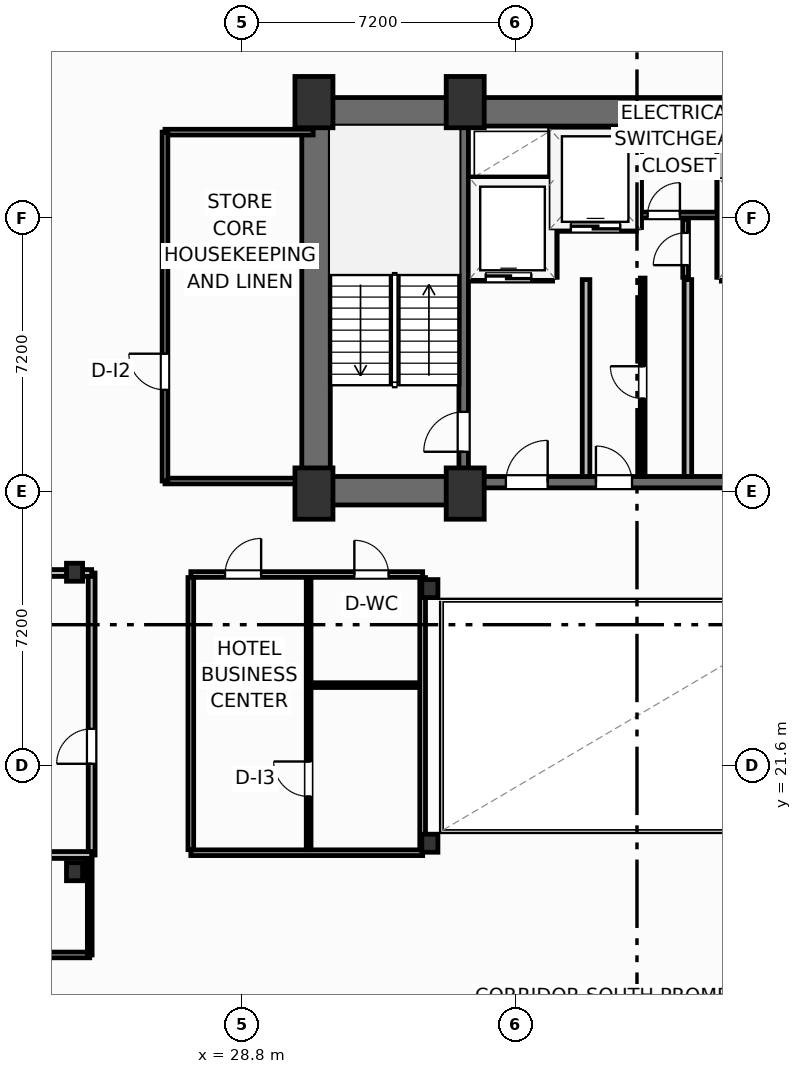
"""IFC4 building model, lengths in metres.
Left out: names, types, materials, properties, quantities, classifications, styles, units other than length and angle.
Written with IfcOpenShell. Run it as: python <this file> out.ifc"""

import sys

from ifc_helpers import new_model, si_unit, direction, frame, frame_2d, origin, origin_2d, place, context, subcontext, project, spatial, rectangle, i_section, extrude, element, fill, save


model = new_model("IFC4")
c1 = context("Model", 3, precision=1e-05, world=origin(), true_north=direction((0.0, 1.0)))
c2 = subcontext(c1, "Body", "Model", "MODEL_VIEW")
j1 = project(units=[si_unit("LENGTHUNIT", "METRE"), si_unit("PLANEANGLEUNIT", "RADIAN")], contexts=[c1])
p1 = place(None, origin())
s1 = spatial("IfcSite", under=j1, at=p1, CompositionType="ELEMENT")
p2 = place(p1, origin())
s2 = spatial("IfcBuilding", under=s1, at=p2, CompositionType="ELEMENT")
p3 = place(p2, frame((0.0, 0.0, 132.8)))
s3 = spatial("IfcBuildingStorey", under=s2, at=p3, CompositionType="ELEMENT", Elevation=132.8)
for number, where, z_axis, x_axis in (
    (1, (30.7, 28.75, 0.0), (0.0, 0.0, 1.0), (1.0, 0.0, 0.0)),
    (2, (34.68, 28.75, 0.0), (0.0, 0.0, 1.0), (1.0, 0.0, 0.0)),
    (3, (30.7, 39.05, 0.0), (0.0, 0.0, 1.0), (1.0, 0.0, 0.0)),
    (4, (34.68, 39.05, 0.0), (0.0, 0.0, 1.0), (1.0, 0.0, 0.0)),
):
    element("IfcColumn", number, at=place(p3, frame(where, z_axis=z_axis, x_axis=x_axis)), inside=s3, PredefinedType="COLUMN", context=c2, shape_type="SweptSolid", body=[
        extrude(rectangle(XDim=1.0, YDim=1.35, at=origin_2d()), origin(), (0.0, 0.0, 1.0), 3.7),
    ])
for number, where, z_axis, x_axis in (
    (5, (33.75, 19.55, 0.0), (0.0, 0.0, 1.0), (1.0, 0.0, 0.0)),
    (6, (33.75, 26.25, 0.0), (0.0, 0.0, 1.0), (1.0, 0.0, 0.0)),
    (7, (24.4, 18.8, 0.0), (0.0, 0.0, 1.0), (1.0, 0.0, 0.0)),
    (8, (24.4, 26.68, 0.0), (0.0, 0.0, 1.0), (1.0, 0.0, 0.0)),
):
    element("IfcColumn", number, at=place(p3, frame(where, z_axis=z_axis, x_axis=x_axis)), inside=s3, PredefinedType="COLUMN", context=c2, shape_type="SweptSolid", body=[
        extrude(i_section(OverallWidth=0.424, OverallDepth=0.474, WebThickness=0.048, FlangeThickness=0.077, FilletRadius=0.025, at=origin_2d()), origin(), (0.0, 0.0, 1.0), 3.7),
    ])
p4 = place(p3, frame((30.38, 38.795, 0.0), z_axis=(0.0, 0.0, 1.0), x_axis=(1.0, 0.0, 0.0)))
e9 = element("IfcWall", 9, at=p4, inside=s3, PredefinedType="SHEAR", context=c2, shape_type="SweptSolid", body=[
    extrude(rectangle(XDim=17.64, YDim=0.75, at=frame_2d((8.82, 0.0))), origin(), (0.0, 0.0, 1.0), 3.45),
])
p5 = place(p3, frame((30.755, 29.2, 0.0), z_axis=(0.0, 0.0, 1.0), x_axis=(0.0, 1.0, 0.0)))
e10 = element("IfcWall", 10, at=p5, inside=s3, PredefinedType="SHEAR", context=c2, shape_type="SweptSolid", body=[
    extrude(rectangle(XDim=9.22, YDim=0.75, at=frame_2d((4.61, 0.0))), origin(), (0.0, 0.0, 1.0), 3.45),
])
p6 = place(p3, frame((30.38, 28.825, 0.0), z_axis=(0.0, 0.0, 1.0), x_axis=(1.0, 0.0, 0.0)))
e11 = element("IfcWall", 11, at=p6, inside=s3, PredefinedType="SHEAR", context=c2, shape_type="SweptSolid", body=[
    extrude(rectangle(XDim=4.42, YDim=0.75, at=frame_2d((2.21, 0.0))), origin(), (0.0, 0.0, 1.0), 3.45),
])
p7 = place(p3, frame((34.8, 29.05, 0.0), z_axis=(0.0, 0.0, 1.0), x_axis=(1.0, 0.0, 0.0)))
e12 = element("IfcWall", 12, at=p7, inside=s3, PredefinedType="SHEAR", context=c2, shape_type="SweptSolid", body=[
    extrude(rectangle(XDim=8.8, YDim=0.3, at=frame_2d((4.4, 0.0))), origin(), (0.0, 0.0, 1.0), 3.45),
])
p8 = place(p7, frame((0.95, 0.0, 0.0)))
e13 = element("IfcOpeningElement", 13, at=p8, cuts=e12, PredefinedType="OPENING", context=c2, shape_type="SweptSolid", body=[
    extrude(rectangle(XDim=1.1, YDim=2.15, at=frame_2d((0.55, 1.075))), frame((0.0, 0.16, 0.0), z_axis=(0.0, -1.0, 0.0), x_axis=(1.0, 0.0, 0.0)), (0.0, 0.0, 1.0), 0.32),
])
p9 = place(p7, frame((6.75, 0.0, 0.0)))
e14 = element("IfcOpeningElement", 14, at=p9, cuts=e12, PredefinedType="OPENING", context=c2, shape_type="SweptSolid", body=[
    extrude(rectangle(XDim=1.1, YDim=2.15, at=frame_2d((0.55, 1.075))), frame((0.0, 0.16, 0.0), z_axis=(0.0, -1.0, 0.0), x_axis=(1.0, 0.0, 0.0)), (0.0, 0.0, 1.0), 0.32),
])
p10 = place(p7, frame((3.32, 0.0, 0.0)))
e15 = element("IfcOpeningElement", 15, at=p10, cuts=e12, PredefinedType="OPENING", context=c2, shape_type="SweptSolid", body=[
    extrude(rectangle(XDim=0.95, YDim=2.15, at=frame_2d((0.475, 1.075))), frame((0.0, 0.16, 0.0), z_axis=(0.0, -1.0, 0.0), x_axis=(1.0, 0.0, 0.0)), (0.0, 0.0, 1.0), 0.32),
])
p11 = place(p3, frame((34.64, 29.2, 0.0), z_axis=(0.0, 0.0, 1.0), x_axis=(0.0, 1.0, 0.0)))
e16 = element("IfcWall", 16, at=p11, inside=s3, PredefinedType="SHEAR", context=c2, shape_type="SweptSolid", body=[
    extrude(rectangle(XDim=9.22, YDim=0.25, at=frame_2d((4.61, 0.0))), origin(), (0.0, 0.0, 1.0), 3.45),
])
p12 = place(p11, frame((0.65, 0.0, 0.0)))
e17 = element("IfcOpeningElement", 17, at=p12, cuts=e16, PredefinedType="OPENING", context=c2, shape_type="SweptSolid", body=[
    extrude(rectangle(XDim=1.05, YDim=2.15, at=frame_2d((0.525, 1.075))), frame((0.0, 0.135, 0.0), z_axis=(0.0, -1.0, 0.0), x_axis=(1.0, 0.0, 0.0)), (0.0, 0.0, 1.0), 0.27),
])
p13 = place(p3, frame((5.0, 16.61, 0.0), z_axis=(0.0, 0.0, 1.0), x_axis=(1.0, 0.0, 0.0)))
e18 = element("IfcWall", 18, at=p13, inside=s3, PredefinedType="PARTITIONING", context=c2, shape_type="SweptSolid", body=[
    extrude(rectangle(XDim=19.8, YDim=0.15, at=frame_2d((9.9, 0.0))), origin(), (0.0, 0.0, 1.0), 3.45),
])
p14 = place(p13, frame((12.485, 0.0, 0.0)))
e19 = element("IfcOpeningElement", 19, at=p14, cuts=e18, PredefinedType="OPENING", context=c2, shape_type="SweptSolid", body=[
    extrude(rectangle(XDim=0.92, YDim=2.05, at=frame_2d((0.46, 1.025))), frame((0.0, 0.085, 0.0), z_axis=(0.0, -1.0, 0.0), x_axis=(1.0, 0.0, 0.0)), (0.0, 0.0, 1.0), 0.17),
])
p15 = place(p3, frame((24.8, 16.61, 0.0), z_axis=(0.0, 0.0, 1.0), x_axis=(0.0, 1.0, 0.0)))
e20 = element("IfcWall", 20, at=p15, inside=s3, PredefinedType="PARTITIONING", context=c2, shape_type="SweptSolid", body=[
    extrude(rectangle(XDim=2.63, YDim=0.125, at=frame_2d((1.315, 0.0))), origin(), (0.0, 0.0, 1.0), 2.662),
])
p16 = place(p3, frame((24.85, 19.24, 0.0), z_axis=(0.0, 0.0, 1.0), x_axis=(0.0, 1.0, 0.0)))
e21 = element("IfcWall", 21, at=p16, inside=s3, PredefinedType="PARTITIONING", context=c2, shape_type="SweptSolid", body=[
    extrude(rectangle(XDim=7.42, YDim=0.18, at=frame_2d((3.71, 0.0))), origin(), (0.0, 0.0, 1.0), 3.45),
])
p17 = place(p16, frame((2.4, 0.0, 0.0)))
e22 = element("IfcOpeningElement", 22, at=p17, cuts=e21, PredefinedType="OPENING", context=c2, shape_type="SweptSolid", body=[
    extrude(rectangle(XDim=0.92, YDim=2.05, at=frame_2d((0.46, 1.025))), frame((0.0, 0.1, 0.0), z_axis=(0.0, -1.0, 0.0), x_axis=(1.0, 0.0, 0.0)), (0.0, 0.0, 1.0), 0.2),
])
p18 = place(p3, frame((19.2, 19.24, 0.0), z_axis=(0.0, 0.0, 1.0), x_axis=(1.0, 0.0, 0.0)))
e23 = element("IfcWall", 23, at=p18, inside=s3, PredefinedType="PARTITIONING", context=c2, shape_type="SweptSolid", body=[
    extrude(rectangle(XDim=5.65, YDim=0.18, at=frame_2d((2.825, 0.0))), origin(), (0.0, 0.0, 1.0), 3.45),
])
p19 = place(p3, frame((2.073, 26.66, 0.0), z_axis=(0.0, 0.0, 1.0), x_axis=(1.0, 0.0, 0.0)))
e24 = element("IfcWall", 24, at=p19, inside=s3, PredefinedType="PARTITIONING", context=c2, shape_type="SweptSolid", body=[
    extrude(rectangle(XDim=22.777, YDim=0.18, at=frame_2d((11.388, 0.0))), origin(), (0.0, 0.0, 1.0), 2.662),
])
for number, where, z_axis, x_axis in (
    (25, (37.86, 29.2, 0.0), (0.0, 0.0, 1.0), (0.0, 1.0, 0.0)),
    (26, (40.54, 29.2, 0.0), (0.0, 0.0, 1.0), (0.0, 1.0, 0.0)),
):
    element("IfcWall", number, at=place(p3, frame(where, z_axis=z_axis, x_axis=x_axis)), inside=s3, PredefinedType="PARTITIONING", context=c2, shape_type="SweptSolid", body=[
        extrude(rectangle(XDim=5.18, YDim=0.2, at=frame_2d((2.59, 0.0))), origin(), (0.0, 0.0, 1.0), 3.45),
    ])
p20 = place(p3, frame((34.8, 34.44, 0.0), z_axis=(0.0, 0.0, 1.0), x_axis=(1.0, 0.0, 0.0)))
e27 = element("IfcWall", 27, at=p20, inside=s3, PredefinedType="PARTITIONING", context=c2, shape_type="SweptSolid", body=[
    extrude(rectangle(XDim=2.18, YDim=0.2, at=frame_2d((1.09, 0.0))), origin(), (0.0, 0.0, 1.0), 3.45),
])
p21 = place(p20, frame((0.42, 0.0, 0.0)))
e28 = element("IfcOpeningElement", 28, at=p21, cuts=e27, PredefinedType="OPENING", context=c2, shape_type="SweptSolid", body=[
    extrude(rectangle(XDim=1.2, YDim=2.2, at=frame_2d((0.6, 1.1))), frame((0.0, 0.11, 0.0), z_axis=(0.0, -1.0, 0.0), x_axis=(1.0, 0.0, 0.0)), (0.0, 0.0, 1.0), 0.22),
])
p22 = place(p3, frame((34.8, 36.98, 0.0), z_axis=(0.0, 0.0, 1.0), x_axis=(1.0, 0.0, 0.0)))
e29 = element("IfcWall", 29, at=p22, inside=s3, PredefinedType="PARTITIONING", context=c2, shape_type="SweptSolid", body=[
    extrude(rectangle(XDim=2.18, YDim=0.2, at=frame_2d((1.09, 0.0))), origin(), (0.0, 0.0, 1.0), 3.45),
])
for number, where, z_axis, x_axis in (
    (30, (37.0, 34.44, 0.0), (0.0, 0.0, 1.0), (0.0, 1.0, 0.0)),
    (31, (41.4, 34.44, 0.0), (0.0, 0.0, 1.0), (0.0, 1.0, 0.0)),
):
    element("IfcWall", number, at=place(p3, frame(where, z_axis=z_axis, x_axis=x_axis)), inside=s3, PredefinedType="PARTITIONING", context=c2, shape_type="SweptSolid", body=[
        extrude(rectangle(XDim=3.9, YDim=0.2, at=frame_2d((1.95, 0.0))), origin(), (0.0, 0.0, 1.0), 3.45),
    ])
p23 = place(p3, frame((37.06, 35.75, 0.0), z_axis=(0.0, 0.0, 1.0), x_axis=(1.0, 0.0, 0.0)))
e32 = element("IfcWall", 32, at=p23, inside=s3, PredefinedType="PARTITIONING", context=c2, shape_type="SweptSolid", body=[
    extrude(rectangle(XDim=2.12, YDim=0.2, at=frame_2d((1.06, 0.0))), origin(), (0.0, 0.0, 1.0), 3.45),
])
p24 = place(p23, frame((0.4, 0.0, 0.0)))
e33 = element("IfcOpeningElement", 33, at=p24, cuts=e32, PredefinedType="OPENING", context=c2, shape_type="SweptSolid", body=[
    extrude(rectangle(XDim=1.3, YDim=2.2, at=frame_2d((0.65, 1.1))), frame((0.0, 0.11, 0.0), z_axis=(0.0, -1.0, 0.0), x_axis=(1.0, 0.0, 0.0)), (0.0, 0.0, 1.0), 0.22),
])
p25 = place(p3, frame((39.22, 35.75, 0.0), z_axis=(0.0, 0.0, 1.0), x_axis=(0.0, 1.0, 0.0)))
e34 = element("IfcWall", 34, at=p25, inside=s3, PredefinedType="PARTITIONING", context=c2, shape_type="SweptSolid", body=[
    extrude(rectangle(XDim=2.59, YDim=0.2, at=frame_2d((1.295, 0.0))), origin(), (0.0, 0.0, 1.0), 3.45),
])
p26 = place(p3, frame((39.3, 36.08, 0.0), z_axis=(0.0, 0.0, 1.0), x_axis=(1.0, 0.0, 0.0)))
e35 = element("IfcWall", 35, at=p26, inside=s3, PredefinedType="PARTITIONING", context=c2, shape_type="SweptSolid", body=[
    extrude(rectangle(XDim=2.02, YDim=0.15, at=frame_2d((1.01, 0.0))), origin(), (0.0, 0.0, 1.0), 3.45),
])
p27 = place(p26, frame((0.18, 0.0, 0.0)))
e36 = element("IfcOpeningElement", 36, at=p27, cuts=e35, PredefinedType="OPENING", context=c2, shape_type="SweptSolid", body=[
    extrude(rectangle(XDim=0.85, YDim=2.05, at=frame_2d((0.425, 1.025))), frame((0.0, 0.085, 0.0), z_axis=(0.0, -1.0, 0.0), x_axis=(1.0, 0.0, 0.0)), (0.0, 0.0, 1.0), 0.17),
])
p28 = place(p3, frame((40.48, 34.44, 0.0), z_axis=(0.0, 0.0, 1.0), x_axis=(0.0, 1.0, 0.0)))
e37 = element("IfcWall", 37, at=p28, inside=s3, PredefinedType="PARTITIONING", context=c2, shape_type="SweptSolid", body=[
    extrude(rectangle(XDim=1.52, YDim=0.15, at=frame_2d((0.76, 0.0))), origin(), (0.0, 0.0, 1.0), 3.45),
])
p29 = place(p28, frame((0.32, 0.0, 0.0)))
e38 = element("IfcOpeningElement", 38, at=p29, cuts=e37, PredefinedType="OPENING", context=c2, shape_type="SweptSolid", body=[
    extrude(rectangle(XDim=0.85, YDim=2.05, at=frame_2d((0.425, 1.025))), frame((0.0, 0.085, 0.0), z_axis=(0.0, -1.0, 0.0), x_axis=(1.0, 0.0, 0.0)), (0.0, 0.0, 1.0), 0.17),
])
p30 = place(p3, frame((39.35, 29.2, 0.0), z_axis=(0.0, 0.0, 1.0), x_axis=(0.0, 1.0, 0.0)))
e39 = element("IfcWall", 39, at=p30, inside=s3, PredefinedType="PARTITIONING", context=c2, shape_type="SweptSolid", body=[
    extrude(rectangle(XDim=5.22, YDim=0.125, at=frame_2d((2.61, 0.0))), origin(), (0.0, 0.0, 1.0), 3.45),
])
p31 = place(p30, frame((2.05, 0.0, 0.0)))
e40 = element("IfcOpeningElement", 40, at=p31, cuts=e39, PredefinedType="OPENING", context=c2, shape_type="SweptSolid", body=[
    extrude(rectangle(XDim=0.85, YDim=2.05, at=frame_2d((0.425, 1.025))), frame((0.0, 0.073, 0.0), z_axis=(0.0, -1.0, 0.0), x_axis=(1.0, 0.0, 0.0)), (0.0, 0.0, 1.0), 0.145),
])
p32 = place(p3, frame((27.46, 26.62, 0.0), z_axis=(0.0, 0.0, 1.0), x_axis=(1.0, 0.0, 0.0)))
e41 = element("IfcWall", 41, at=p32, inside=s3, PredefinedType="PARTITIONING", context=c2, shape_type="SweptSolid", body=[
    extrude(rectangle(XDim=6.1, YDim=0.15, at=frame_2d((3.05, 0.0))), origin(), (0.0, 0.0, 1.0), 2.662),
])
p33 = place(p32, frame((0.9, 0.0, 0.0)))
e42 = element("IfcOpeningElement", 42, at=p33, cuts=e41, PredefinedType="OPENING", context=c2, shape_type="SweptSolid", body=[
    extrude(rectangle(XDim=0.95, YDim=2.05, at=frame_2d((0.475, 1.025))), frame((0.0, 0.085, 0.0), z_axis=(0.0, -1.0, 0.0), x_axis=(1.0, 0.0, 0.0)), (0.0, 0.0, 1.0), 0.17),
])
p34 = place(p32, frame((4.303, 0.0, 0.0)))
e43 = element("IfcOpeningElement", 43, at=p34, cuts=e41, PredefinedType="OPENING", context=c2, shape_type="SweptSolid", body=[
    extrude(rectangle(XDim=0.9, YDim=2.05, at=frame_2d((0.45, 1.025))), frame((0.0, 0.085, 0.0), z_axis=(0.0, -1.0, 0.0), x_axis=(1.0, 0.0, 0.0)), (0.0, 0.0, 1.0), 0.17),
])
p35 = place(p3, frame((27.46, 19.3, 0.0), z_axis=(0.0, 0.0, 1.0), x_axis=(1.0, 0.0, 0.0)))
e44 = element("IfcWall", 44, at=p35, inside=s3, PredefinedType="PARTITIONING", context=c2, shape_type="SweptSolid", body=[
    extrude(rectangle(XDim=6.1, YDim=0.15, at=frame_2d((3.05, 0.0))), origin(), (0.0, 0.0, 1.0), 2.662),
])
p36 = place(p3, frame((30.56, 19.38, 0.0), z_axis=(0.0, 0.0, 1.0), x_axis=(0.0, 1.0, 0.0)))
e45 = element("IfcWall", 45, at=p36, inside=s3, PredefinedType="PARTITIONING", context=c2, shape_type="SweptSolid", body=[
    extrude(rectangle(XDim=7.16, YDim=0.125, at=frame_2d((3.58, 0.0))), origin(), (0.0, 0.0, 1.0), 3.45),
])
p37 = place(p36, frame((1.4, 0.0, 0.0)))
e46 = element("IfcOpeningElement", 46, at=p37, cuts=e45, PredefinedType="OPENING", context=c2, shape_type="SweptSolid", body=[
    extrude(rectangle(XDim=0.92, YDim=2.05, at=frame_2d((0.46, 1.025))), frame((0.0, 0.073, 0.0), z_axis=(0.0, -1.0, 0.0), x_axis=(1.0, 0.0, 0.0)), (0.0, 0.0, 1.0), 0.145),
])
p38 = place(p3, frame((30.64, 23.71, 0.0), z_axis=(0.0, 0.0, 1.0), x_axis=(1.0, 0.0, 0.0)))
e47 = element("IfcWall", 47, at=p38, inside=s3, PredefinedType="PARTITIONING", context=c2, shape_type="SweptSolid", body=[
    extrude(rectangle(XDim=2.88, YDim=0.125, at=frame_2d((1.44, 0.0))), origin(), (0.0, 0.0, 1.0), 3.45),
])
p39 = place(p3, frame((27.46, 19.38, 0.0), z_axis=(0.0, 0.0, 1.0), x_axis=(0.0, 1.0, 0.0)))
e48 = element("IfcWall", 48, at=p39, inside=s3, PredefinedType="PARTITIONING", context=c2, shape_type="SweptSolid", body=[
    extrude(rectangle(XDim=7.16, YDim=0.15, at=frame_2d((3.58, 0.0))), origin(), (0.0, 0.0, 1.0), 3.45),
])
p40 = place(p3, frame((33.56, 19.38, 0.0), z_axis=(0.0, 0.0, 1.0), x_axis=(0.0, 1.0, 0.0)))
e49 = element("IfcWall", 49, at=p40, inside=s3, PredefinedType="PARTITIONING", context=c2, shape_type="SweptSolid", body=[
    extrude(rectangle(XDim=7.16, YDim=0.15, at=frame_2d((3.58, 0.0))), origin(), (0.0, 0.0, 1.0), 2.824),
])
p41 = place(p3, frame((26.78, 29.08, 0.0), z_axis=(0.0, 0.0, 1.0), x_axis=(1.0, 0.0, 0.0)))
e50 = element("IfcWall", 50, at=p41, inside=s3, PredefinedType="PARTITIONING", context=c2, shape_type="SweptSolid", body=[
    extrude(rectangle(XDim=3.6, YDim=0.15, at=frame_2d((1.8, 0.0))), origin(), (0.0, 0.0, 1.0), 3.45),
])
p42 = place(p3, frame((26.78, 38.26, 0.0), z_axis=(0.0, 0.0, 1.0), x_axis=(1.0, 0.0, 0.0)))
e51 = element("IfcWall", 51, at=p42, inside=s3, PredefinedType="PARTITIONING", context=c2, shape_type="SweptSolid", body=[
    extrude(rectangle(XDim=3.9, YDim=0.15, at=frame_2d((1.95, 0.0))), origin(), (0.0, 0.0, 1.0), 3.45),
])
p43 = place(p3, frame((26.78, 29.08, 0.0), z_axis=(0.0, 0.0, 1.0), x_axis=(0.0, 1.0, 0.0)))
e52 = element("IfcWall", 52, at=p43, inside=s3, PredefinedType="PARTITIONING", context=c2, shape_type="SweptSolid", body=[
    extrude(rectangle(XDim=9.18, YDim=0.15, at=frame_2d((4.59, 0.0))), origin(), (0.0, 0.0, 1.0), 3.45),
])
p44 = place(p43, frame((2.4, 0.0, 0.0)))
e53 = element("IfcOpeningElement", 53, at=p44, cuts=e52, PredefinedType="OPENING", context=c2, shape_type="SweptSolid", body=[
    extrude(rectangle(XDim=0.95, YDim=2.05, at=frame_2d((0.475, 1.025))), frame((0.0, 0.085, 0.0), z_axis=(0.0, -1.0, 0.0), x_axis=(1.0, 0.0, 0.0)), (0.0, 0.0, 1.0), 0.17),
])
p45 = place(p17, origin())
e54 = element("IfcDoor", 54, at=p45, inside=s3, OperationType="SINGLE_SWING_LEFT", PredefinedType="DOOR", context=c2, shape_type="SweptSolid", body=[
    extrude(rectangle(XDim=0.92, YDim=2.05, at=frame_2d((0.46, 1.025))), frame((0.0, 0.025, 0.0), z_axis=(0.0, -1.0, 0.0), x_axis=(1.0, 0.0, 0.0)), (0.0, 0.0, 1.0), 0.05),
])
fill(e22, e54)
p46 = place(p12, origin())
e55 = element("IfcDoor", 55, at=p46, inside=s3, OperationType="SINGLE_SWING_LEFT", PredefinedType="DOOR", context=c2, shape_type="SweptSolid", body=[
    extrude(rectangle(XDim=1.05, YDim=2.15, at=frame_2d((0.525, 1.075))), frame((0.0, 0.025, 0.0), z_axis=(0.0, -1.0, 0.0), x_axis=(1.0, 0.0, 0.0)), (0.0, 0.0, 1.0), 0.05),
])
fill(e17, e55)
p47 = place(p8, origin())
e56 = element("IfcDoor", 56, at=p47, inside=s3, OperationType="SINGLE_SWING_RIGHT", PredefinedType="DOOR", context=c2, shape_type="SweptSolid", body=[
    extrude(rectangle(XDim=1.1, YDim=2.15, at=frame_2d((0.55, 1.075))), frame((0.0, 0.025, 0.0), z_axis=(0.0, -1.0, 0.0), x_axis=(1.0, 0.0, 0.0)), (0.0, 0.0, 1.0), 0.05),
])
fill(e13, e56)
p48 = place(p21, origin())
e57 = element("IfcDoor", 57, at=p48, inside=s3, OperationType="SLIDING_TO_LEFT", PredefinedType="DOOR", context=c2, shape_type="SweptSolid", body=[
    extrude(rectangle(XDim=1.2, YDim=2.2, at=frame_2d((0.6, 1.1))), frame((0.0, 0.025, 0.0), z_axis=(0.0, -1.0, 0.0), x_axis=(1.0, 0.0, 0.0)), (0.0, 0.0, 1.0), 0.05),
])
fill(e28, e57)
p49 = place(p24, origin())
e58 = element("IfcDoor", 58, at=p49, inside=s3, OperationType="SLIDING_TO_LEFT", PredefinedType="DOOR", context=c2, shape_type="SweptSolid", body=[
    extrude(rectangle(XDim=1.3, YDim=2.2, at=frame_2d((0.65, 1.1))), frame((0.0, 0.025, 0.0), z_axis=(0.0, -1.0, 0.0), x_axis=(1.0, 0.0, 0.0)), (0.0, 0.0, 1.0), 0.05),
])
fill(e33, e58)
p50 = place(p27, origin())
e59 = element("IfcDoor", 59, at=p50, inside=s3, OperationType="SINGLE_SWING_RIGHT", PredefinedType="DOOR", context=c2, shape_type="SweptSolid", body=[
    extrude(rectangle(XDim=0.85, YDim=2.05, at=frame_2d((0.425, 1.025))), frame((0.0, 0.025, 0.0), z_axis=(0.0, -1.0, 0.0), x_axis=(1.0, 0.0, 0.0)), (0.0, 0.0, 1.0), 0.05),
])
fill(e36, e59)
p51 = place(p29, origin())
e60 = element("IfcDoor", 60, at=p51, inside=s3, OperationType="SINGLE_SWING_LEFT", PredefinedType="DOOR", context=c2, shape_type="SweptSolid", body=[
    extrude(rectangle(XDim=0.85, YDim=2.05, at=frame_2d((0.425, 1.025))), frame((0.0, 0.025, 0.0), z_axis=(0.0, -1.0, 0.0), x_axis=(1.0, 0.0, 0.0)), (0.0, 0.0, 1.0), 0.05),
])
fill(e38, e60)
p52 = place(p31, origin())
e61 = element("IfcDoor", 61, at=p52, inside=s3, OperationType="SINGLE_SWING_RIGHT", PredefinedType="DOOR", context=c2, shape_type="SweptSolid", body=[
    extrude(rectangle(XDim=0.85, YDim=2.05, at=frame_2d((0.425, 1.025))), frame((0.0, 0.025, 0.0), z_axis=(0.0, -1.0, 0.0), x_axis=(1.0, 0.0, 0.0)), (0.0, 0.0, 1.0), 0.05),
])
fill(e40, e61)
p53 = place(p10, origin())
e62 = element("IfcDoor", 62, at=p53, inside=s3, OperationType="SINGLE_SWING_LEFT", PredefinedType="DOOR", context=c2, shape_type="SweptSolid", body=[
    extrude(rectangle(XDim=0.95, YDim=2.15, at=frame_2d((0.475, 1.075))), frame((0.0, 0.025, 0.0), z_axis=(0.0, -1.0, 0.0), x_axis=(1.0, 0.0, 0.0)), (0.0, 0.0, 1.0), 0.05),
])
fill(e15, e62)
p54 = place(p33, origin())
e63 = element("IfcDoor", 63, at=p54, inside=s3, OperationType="SINGLE_SWING_RIGHT", PredefinedType="DOOR", context=c2, shape_type="SweptSolid", body=[
    extrude(rectangle(XDim=0.95, YDim=2.05, at=frame_2d((0.475, 1.025))), frame((0.0, 0.025, 0.0), z_axis=(0.0, -1.0, 0.0), x_axis=(1.0, 0.0, 0.0)), (0.0, 0.0, 1.0), 0.05),
])
fill(e42, e63)
p55 = place(p34, origin())
e64 = element("IfcDoor", 64, at=p55, inside=s3, OperationType="SINGLE_SWING_LEFT", PredefinedType="DOOR", context=c2, shape_type="SweptSolid", body=[
    extrude(rectangle(XDim=0.9, YDim=2.05, at=frame_2d((0.45, 1.025))), frame((0.0, 0.025, 0.0), z_axis=(0.0, -1.0, 0.0), x_axis=(1.0, 0.0, 0.0)), (0.0, 0.0, 1.0), 0.05),
])
fill(e43, e64)
p56 = place(p37, origin())
e65 = element("IfcDoor", 65, at=p56, inside=s3, OperationType="SINGLE_SWING_RIGHT", PredefinedType="DOOR", context=c2, shape_type="SweptSolid", body=[
    extrude(rectangle(XDim=0.92, YDim=2.05, at=frame_2d((0.46, 1.025))), frame((0.0, 0.025, 0.0), z_axis=(0.0, -1.0, 0.0), x_axis=(1.0, 0.0, 0.0)), (0.0, 0.0, 1.0), 0.05),
])
fill(e46, e65)
p57 = place(p44, origin())
e66 = element("IfcDoor", 66, at=p57, inside=s3, OperationType="SINGLE_SWING_RIGHT", PredefinedType="DOOR", context=c2, shape_type="SweptSolid", body=[
    extrude(rectangle(XDim=0.95, YDim=2.05, at=frame_2d((0.475, 1.025))), frame((0.0, 0.025, 0.0), z_axis=(0.0, -1.0, 0.0), x_axis=(1.0, 0.0, 0.0)), (0.0, 0.0, 1.0), 0.05),
])
fill(e53, e66)
save(model, sys.argv[1])
